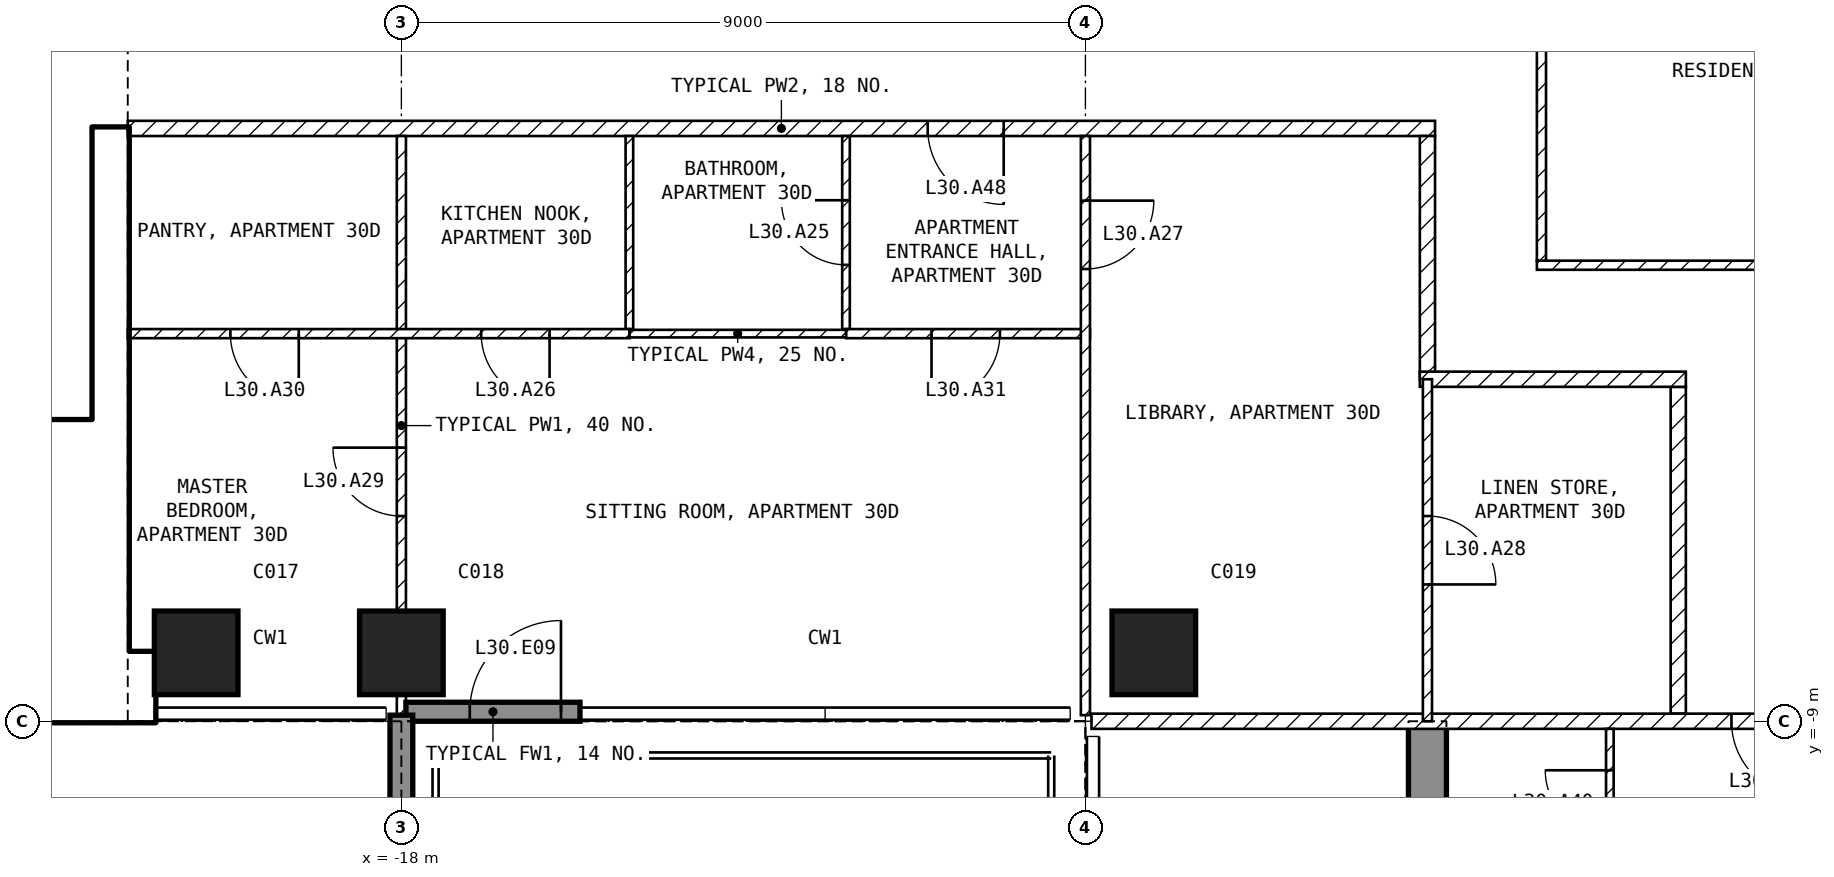
"""IFC4 building model, lengths in metres.
Left out: names, types, materials, properties, quantities, classifications, styles, units other than length and angle.
Written with IfcOpenShell. Run it as: python <this file> out.ifc"""

import sys

from ifc_helpers import new_model, si_unit, direction, frame, frame_2d, origin, origin_2d, place, context, subcontext, project, spatial, polyline, rectangle, outline, extrude, element, fill, save


model = new_model("IFC4")
c1 = context("Model", 3, precision=1e-05, world=origin(), true_north=direction((0.0, 1.0)))
c2 = subcontext(c1, "Body", "Model", "MODEL_VIEW")
j1 = project(units=[si_unit("LENGTHUNIT", "METRE"), si_unit("PLANEANGLEUNIT", "RADIAN")], contexts=[c1])
p1 = place(None, origin())
s1 = spatial("IfcSite", under=j1, at=p1, CompositionType="ELEMENT")
p2 = place(p1, origin())
s2 = spatial("IfcBuilding", under=s1, at=p2, CompositionType="ELEMENT")
p3 = place(p2, frame((0.0, 0.0, 126.9)))
s3 = spatial("IfcBuildingStorey", under=s2, at=p3, CompositionType="ELEMENT", Elevation=126.9)
for number, where, z_axis, x_axis in (
    (1, (-20.7, -8.1, -0.25), (0.0, 0.0, 1.0), (1.0, 0.0, 0.0)),
    (2, (-18.0, -8.1, -0.25), (0.0, 0.0, 1.0), (1.0, 0.0, 0.0)),
    (3, (-8.1, -8.1, -0.25), (0.0, 0.0, 1.0), (1.0, 0.0, 0.0)),
):
    element("IfcColumn", number, at=place(p3, frame(where, z_axis=z_axis, x_axis=x_axis)), inside=s3, PredefinedType="COLUMN", context=c2, shape_type="SweptSolid", body=[
        extrude(rectangle(XDim=1.1, YDim=1.1, at=origin_2d()), origin(), (0.0, 0.0, 1.0), 3.5),
    ])
p4 = place(p3, frame((-4.75, -20.15, -0.25), z_axis=(1.0, 0.0, 0.0), x_axis=(0.0, 1.0, 0.0)))
e4 = element("IfcWall", 4, at=p4, inside=s3, PredefinedType="SHEAR", context=c2, shape_type="SweptSolid", body=[
    extrude(outline(polyline([(0.0, 0.0), (6.65, 0.0), (6.65, 2.65), (9.05, 2.65), (9.05, 0.0), (11.15, 0.0), (11.15, 3.5), (0.0, 3.5), (0.0, 0.0)])), origin(), (0.0, 0.0, 1.0), 0.5),
])
p5 = place(p3, frame((-17.94, -8.875, 0.0), z_axis=(0.0, 0.0, 1.0), x_axis=(1.0, 0.0, 0.0)))
e5 = element("IfcWall", 5, at=p5, inside=s3, PredefinedType="SOLIDWALL", context=c2, shape_type="SweptSolid", body=[
    extrude(rectangle(XDim=2.29, YDim=0.25, at=frame_2d((1.145, 0.0))), origin(), (0.0, 0.0, 1.0), 3.25),
])
p6 = place(p5, frame((0.84, 0.0, 0.0)))
e6 = element("IfcOpeningElement", 6, at=p6, cuts=e5, PredefinedType="OPENING", context=c2, shape_type="SweptSolid", body=[
    extrude(rectangle(XDim=1.2, YDim=2.4, at=frame_2d((0.6, 1.2))), frame((0.0, 0.135, 0.0), z_axis=(0.0, -1.0, 0.0), x_axis=(1.0, 0.0, 0.0)), (0.0, 0.0, 1.0), 0.27),
])
p7 = place(p3, frame((-18.0, -8.92, 0.0), z_axis=(0.0, 0.0, 1.0), x_axis=(0.0, -1.0, 0.0)))
e7 = element("IfcWall", 7, at=p7, inside=s3, PredefinedType="SOLIDWALL", context=c2, shape_type="SweptSolid", body=[
    extrude(rectangle(XDim=2.82, YDim=0.3, at=frame_2d((1.41, 0.0))), origin(), (0.0, 0.0, 1.0), 3.25),
])
p8 = place(p3, frame((-30.2, -8.55, 0.0), z_axis=(0.0, 0.0, 1.0), x_axis=(1.0, 0.0, 0.0)))
e8 = element("IfcWall", 8, at=p8, inside=s3, PredefinedType="SHEAR", context=c2, shape_type="SweptSolid", body=[
    extrude(rectangle(XDim=8.95, YDim=0.9, at=frame_2d((4.475, 0.0))), origin(), (0.0, 0.0, 1.0), 3.25),
])
p9 = place(p3, frame((-21.825, -8.1, 0.0), z_axis=(0.0, 0.0, 1.0), x_axis=(0.0, 1.0, 0.0)))
e9 = element("IfcWall", 9, at=p9, inside=s3, PredefinedType="SHEAR", context=c2, shape_type="SweptSolid", body=[
    extrude(rectangle(XDim=6.9, YDim=0.45, at=frame_2d((3.45, 0.0))), origin(), (0.0, 0.0, 1.0), 3.25),
])
p10 = place(p3, frame((-28.35, -5.15, 0.0), z_axis=(0.0, 0.0, 1.0), x_axis=(1.0, 0.0, 0.0)))
e10 = element("IfcWall", 10, at=p10, inside=s3, PredefinedType="SOLIDWALL", context=c2, shape_type="SweptSolid", body=[
    extrude(rectangle(XDim=6.3, YDim=0.2, at=frame_2d((3.15, 0.0))), origin(), (0.0, 0.0, 1.0), 3.25),
])
p11 = place(p10, frame((5.1, 0.0, 0.0)))
e11 = element("IfcOpeningElement", 11, at=p11, cuts=e10, PredefinedType="OPENING", context=c2, shape_type="SweptSolid", body=[
    extrude(rectangle(XDim=1.0, YDim=2.1, at=frame_2d((0.5, 1.05))), frame((0.0, 0.11, 0.0), z_axis=(0.0, -1.0, 0.0), x_axis=(1.0, 0.0, 0.0)), (0.0, 0.0, 1.0), 0.22),
])
p12 = place(p3, frame((-3.06, -3.0, 0.0), z_axis=(0.0, 0.0, 1.0), x_axis=(1.0, 0.0, 0.0)))
e12 = element("IfcWall", 12, at=p12, inside=s3, PredefinedType="PARTITIONING", context=c2, shape_type="SweptSolid", body=[
    extrude(rectangle(XDim=6.12, YDim=0.12, at=frame_2d((3.06, 0.0))), origin(), (0.0, 0.0, 1.0), 3.25),
])
p13 = place(p3, frame((-3.0, 2.94, 0.0), z_axis=(0.0, 0.0, 1.0), x_axis=(0.0, -1.0, 0.0)))
e13 = element("IfcWall", 13, at=p13, inside=s3, PredefinedType="PARTITIONING", context=c2, shape_type="SweptSolid", body=[
    extrude(rectangle(XDim=5.88, YDim=0.12, at=frame_2d((2.94, 0.0))), origin(), (0.0, 0.0, 1.0), 3.25),
])
p14 = place(p3, frame((-4.4, -1.2, 0.0), z_axis=(0.0, 0.0, 1.0), x_axis=(-1.0, 0.0, 0.0)))
e14 = element("IfcWall", 14, at=p14, inside=s3, PredefinedType="PARTITIONING", context=c2, shape_type="SweptSolid", body=[
    extrude(rectangle(XDim=17.2, YDim=0.2, at=frame_2d((8.6, 0.0))), origin(), (0.0, 0.0, 1.0), 3.25),
])
p15 = place(p14, frame((5.675, 0.0, 0.0)))
e15 = element("IfcOpeningElement", 15, at=p15, cuts=e14, PredefinedType="OPENING", context=c2, shape_type="SweptSolid", body=[
    extrude(rectangle(XDim=1.0, YDim=2.1, at=frame_2d((0.5, 1.05))), frame((0.0, 0.11, 0.0), z_axis=(0.0, -1.0, 0.0), x_axis=(1.0, 0.0, 0.0)), (0.0, 0.0, 1.0), 0.22),
])
p16 = place(p3, frame((-4.5, -4.5, 0.0), z_axis=(0.0, 0.0, 1.0), x_axis=(0.0, 1.0, 0.0)))
e16 = element("IfcWall", 16, at=p16, inside=s3, PredefinedType="PARTITIONING", context=c2, shape_type="SweptSolid", body=[
    extrude(rectangle(XDim=3.2, YDim=0.2, at=frame_2d((1.6, 0.0))), origin(), (0.0, 0.0, 1.0), 3.25),
])
p17 = place(p3, frame((-1.2, -8.9, 0.0), z_axis=(0.0, 0.0, 1.0), x_axis=(0.0, 1.0, 0.0)))
e17 = element("IfcWall", 17, at=p17, inside=s3, PredefinedType="PARTITIONING", context=c2, shape_type="SweptSolid", body=[
    extrude(rectangle(XDim=4.3, YDim=0.2, at=frame_2d((2.15, 0.0))), origin(), (0.0, 0.0, 1.0), 3.25),
])
p18 = place(p3, frame((-1.1, -4.5, 0.0), z_axis=(0.0, 0.0, 1.0), x_axis=(-1.0, 0.0, 0.0)))
e18 = element("IfcWall", 18, at=p18, inside=s3, PredefinedType="PARTITIONING", context=c2, shape_type="SweptSolid", body=[
    extrude(rectangle(XDim=3.5, YDim=0.2, at=frame_2d((1.75, 0.0))), origin(), (0.0, 0.0, 1.0), 3.25),
])
p19 = place(p3, frame((8.92, -9.0, 0.0), z_axis=(0.0, 0.0, 1.0), x_axis=(-1.0, 0.0, 0.0)))
e19 = element("IfcWall", 19, at=p19, inside=s3, PredefinedType="PARTITIONING", context=c2, shape_type="SweptSolid", body=[
    extrude(rectangle(XDim=17.84, YDim=0.2, at=frame_2d((8.92, 0.0))), origin(), (0.0, 0.0, 1.0), 3.25),
])
p20 = place(p19, frame((8.42, 0.0, 0.0)))
e20 = element("IfcOpeningElement", 20, at=p20, cuts=e19, PredefinedType="OPENING", context=c2, shape_type="SweptSolid", body=[
    extrude(rectangle(XDim=1.0, YDim=2.1, at=frame_2d((0.5, 1.05))), frame((0.0, 0.11, 0.0), z_axis=(0.0, -1.0, 0.0), x_axis=(1.0, 0.0, 0.0)), (0.0, 0.0, 1.0), 0.22),
])
p21 = place(p3, frame((-12.15, -3.84, 0.0), z_axis=(0.0, 0.0, 1.0), x_axis=(0.0, 1.0, 0.0)))
e21 = element("IfcWall", 21, at=p21, inside=s3, PredefinedType="PARTITIONING", context=c2, shape_type="SweptSolid", body=[
    extrude(rectangle(XDim=2.54, YDim=0.1, at=frame_2d((1.27, 0.0))), origin(), (0.0, 0.0, 1.0), 3.25),
])
p22 = place(p21, frame((0.845, 0.0, 0.0)))
e22 = element("IfcOpeningElement", 22, at=p22, cuts=e21, PredefinedType="OPENING", context=c2, shape_type="SweptSolid", body=[
    extrude(rectangle(XDim=0.85, YDim=2.1, at=frame_2d((0.425, 1.05))), frame((0.0, 0.06, 0.0), z_axis=(0.0, -1.0, 0.0), x_axis=(1.0, 0.0, 0.0)), (0.0, 0.0, 1.0), 0.12),
])
p23 = place(p3, frame((-8.94, -3.9, 0.0), z_axis=(0.0, 0.0, 1.0), x_axis=(-1.0, 0.0, 0.0)))
e23 = element("IfcWall", 23, at=p23, inside=s3, PredefinedType="PARTITIONING", context=c2, shape_type="SweptSolid", body=[
    extrude(rectangle(XDim=3.21, YDim=0.12, at=frame_2d((1.605, 0.0))), origin(), (0.0, 0.0, 1.0), 3.25),
])
p24 = place(p23, frame((1.185, 0.0, 0.0)))
e24 = element("IfcOpeningElement", 24, at=p24, cuts=e23, PredefinedType="OPENING", context=c2, shape_type="SweptSolid", body=[
    extrude(rectangle(XDim=0.9, YDim=2.1, at=frame_2d((0.45, 1.05))), frame((0.0, 0.07, 0.0), z_axis=(0.0, -1.0, 0.0), x_axis=(1.0, 0.0, 0.0)), (0.0, 0.0, 1.0), 0.14),
])
p25 = place(p3, frame((-9.0, -1.3, 0.0), z_axis=(0.0, 0.0, 1.0), x_axis=(0.0, -1.0, 0.0)))
e25 = element("IfcWall", 25, at=p25, inside=s3, PredefinedType="PARTITIONING", context=c2, shape_type="SweptSolid", body=[
    extrude(rectangle(XDim=7.62, YDim=0.12, at=frame_2d((3.81, 0.0))), origin(), (0.0, 0.0, 1.0), 3.25),
])
p26 = place(p25, frame((0.85, 0.0, 0.0)))
e26 = element("IfcOpeningElement", 26, at=p26, cuts=e25, PredefinedType="OPENING", context=c2, shape_type="SweptSolid", body=[
    extrude(rectangle(XDim=0.9, YDim=2.1, at=frame_2d((0.45, 1.05))), frame((0.0, 0.07, 0.0), z_axis=(0.0, -1.0, 0.0), x_axis=(1.0, 0.0, 0.0)), (0.0, 0.0, 1.0), 0.14),
])
p27 = place(p3, frame((-15.0, -3.84, 0.0), z_axis=(0.0, 0.0, 1.0), x_axis=(0.0, 1.0, 0.0)))
e27 = element("IfcWall", 27, at=p27, inside=s3, PredefinedType="PARTITIONING", context=c2, shape_type="SweptSolid", body=[
    extrude(rectangle(XDim=2.54, YDim=0.1, at=frame_2d((1.27, 0.0))), origin(), (0.0, 0.0, 1.0), 3.25),
])
p28 = place(p3, frame((-12.15, -3.9, 0.0), z_axis=(0.0, 0.0, 1.0), x_axis=(-1.0, 0.0, 0.0)))
e28 = element("IfcWall", 28, at=p28, inside=s3, PredefinedType="PARTITIONING", context=c2, shape_type="SweptSolid", body=[
    extrude(rectangle(XDim=2.85, YDim=0.1, at=frame_2d((1.425, 0.0))), origin(), (0.0, 0.0, 1.0), 3.25),
])
p29 = place(p3, frame((-18.0, -8.92, 0.0), z_axis=(0.0, 0.0, 1.0), x_axis=(0.0, 1.0, 0.0)))
e29 = element("IfcWall", 29, at=p29, inside=s3, PredefinedType="PARTITIONING", context=c2, shape_type="SweptSolid", body=[
    extrude(rectangle(XDim=7.62, YDim=0.12, at=frame_2d((3.81, 0.0))), origin(), (0.0, 0.0, 1.0), 2.414),
])
p30 = place(p29, frame((2.62, 0.0, 0.0)))
e30 = element("IfcOpeningElement", 30, at=p30, cuts=e29, PredefinedType="OPENING", context=c2, shape_type="SweptSolid", body=[
    extrude(rectangle(XDim=0.9, YDim=2.1, at=frame_2d((0.45, 1.05))), frame((0.0, 0.07, 0.0), z_axis=(0.0, -1.0, 0.0), x_axis=(1.0, 0.0, 0.0)), (0.0, 0.0, 1.0), 0.14),
])
p31 = place(p3, frame((-15.0, -3.9, 0.0), z_axis=(0.0, 0.0, 1.0), x_axis=(-1.0, 0.0, 0.0)))
e31 = element("IfcWall", 31, at=p31, inside=s3, PredefinedType="PARTITIONING", context=c2, shape_type="SweptSolid", body=[
    extrude(rectangle(XDim=6.6, YDim=0.12, at=frame_2d((3.3, 0.0))), origin(), (0.0, 0.0, 1.0), 3.25),
])
p32 = place(p31, frame((1.05, 0.0, 0.0)))
e32 = element("IfcOpeningElement", 32, at=p32, cuts=e31, PredefinedType="OPENING", context=c2, shape_type="SweptSolid", body=[
    extrude(rectangle(XDim=0.9, YDim=2.1, at=frame_2d((0.45, 1.05))), frame((0.0, 0.07, 0.0), z_axis=(0.0, -1.0, 0.0), x_axis=(1.0, 0.0, 0.0)), (0.0, 0.0, 1.0), 0.14),
])
p33 = place(p31, frame((4.35, 0.0, 0.0)))
e33 = element("IfcOpeningElement", 33, at=p33, cuts=e31, PredefinedType="OPENING", context=c2, shape_type="SweptSolid", body=[
    extrude(rectangle(XDim=0.9, YDim=2.1, at=frame_2d((0.45, 1.05))), frame((0.0, 0.07, 0.0), z_axis=(0.0, -1.0, 0.0), x_axis=(1.0, 0.0, 0.0)), (0.0, 0.0, 1.0), 0.14),
])
p34 = place(p3, frame((-4.5, -4.5, 0.0), z_axis=(0.0, 0.0, 1.0), x_axis=(0.0, -1.0, 0.0)))
e34 = element("IfcWall", 34, at=p34, inside=s3, PredefinedType="PARTITIONING", context=c2, shape_type="SweptSolid", body=[
    extrude(rectangle(XDim=4.5, YDim=0.12, at=frame_2d((2.25, 0.0))), origin(), (0.0, 0.0, 1.0), 3.25),
])
p35 = place(p34, frame((1.8, 0.0, 0.0)))
e35 = element("IfcOpeningElement", 35, at=p35, cuts=e34, PredefinedType="OPENING", context=c2, shape_type="SweptSolid", body=[
    extrude(rectangle(XDim=0.9, YDim=2.1, at=frame_2d((0.45, 1.05))), frame((0.0, 0.07, 0.0), z_axis=(0.0, -1.0, 0.0), x_axis=(1.0, 0.0, 0.0)), (0.0, 0.0, 1.0), 0.14),
])
p36 = place(p3, frame((-2.1, -11.04, 0.0), z_axis=(0.0, 0.0, 1.0), x_axis=(0.0, 1.0, 0.0)))
e36 = element("IfcWall", 36, at=p36, inside=s3, PredefinedType="PARTITIONING", context=c2, shape_type="SweptSolid", body=[
    extrude(rectangle(XDim=1.94, YDim=0.1, at=frame_2d((0.97, 0.0))), origin(), (0.0, 0.0, 1.0), 3.25),
])
p37 = place(p36, frame((0.545, 0.0, 0.0)))
e37 = element("IfcOpeningElement", 37, at=p37, cuts=e36, PredefinedType="OPENING", context=c2, shape_type="SweptSolid", body=[
    extrude(rectangle(XDim=0.85, YDim=2.1, at=frame_2d((0.425, 1.05))), frame((0.0, 0.06, 0.0), z_axis=(0.0, -1.0, 0.0), x_axis=(1.0, 0.0, 0.0)), (0.0, 0.0, 1.0), 0.12),
])
p38 = place(p6, origin())
e38 = element("IfcDoor", 38, at=p38, inside=s3, OperationType="SINGLE_SWING_RIGHT", PredefinedType="DOOR", context=c2, shape_type="SweptSolid", body=[
    extrude(rectangle(XDim=1.2, YDim=2.4, at=frame_2d((0.6, 1.2))), frame((0.0, 0.025, 0.0), z_axis=(0.0, -1.0, 0.0), x_axis=(1.0, 0.0, 0.0)), (0.0, 0.0, 1.0), 0.05),
])
fill(e6, e38)
p39 = place(p11, origin())
e39 = element("IfcDoor", 39, at=p39, inside=s3, OperationType="SINGLE_SWING_LEFT", PredefinedType="DOOR", context=c2, shape_type="SweptSolid", body=[
    extrude(rectangle(XDim=1.0, YDim=2.1, at=frame_2d((0.5, 1.05))), frame((0.0, 0.025, 0.0), z_axis=(0.0, -1.0, 0.0), x_axis=(1.0, 0.0, 0.0)), (0.0, 0.0, 1.0), 0.05),
])
fill(e11, e39)
p40 = place(p22, origin())
e40 = element("IfcDoor", 40, at=p40, inside=s3, OperationType="SINGLE_SWING_RIGHT", PredefinedType="DOOR", context=c2, shape_type="SweptSolid", body=[
    extrude(rectangle(XDim=0.85, YDim=2.1, at=frame_2d((0.425, 1.05))), frame((0.0, 0.025, 0.0), z_axis=(0.0, -1.0, 0.0), x_axis=(1.0, 0.0, 0.0)), (0.0, 0.0, 1.0), 0.05),
])
fill(e22, e40)
p41 = place(p32, origin())
e41 = element("IfcDoor", 41, at=p41, inside=s3, OperationType="SINGLE_SWING_LEFT", PredefinedType="DOOR", context=c2, shape_type="SweptSolid", body=[
    extrude(rectangle(XDim=0.9, YDim=2.1, at=frame_2d((0.45, 1.05))), frame((0.0, 0.025, 0.0), z_axis=(0.0, -1.0, 0.0), x_axis=(1.0, 0.0, 0.0)), (0.0, 0.0, 1.0), 0.05),
])
fill(e32, e41)
p42 = place(p26, origin())
e42 = element("IfcDoor", 42, at=p42, inside=s3, OperationType="SINGLE_SWING_LEFT", PredefinedType="DOOR", context=c2, shape_type="SweptSolid", body=[
    extrude(rectangle(XDim=0.9, YDim=2.1, at=frame_2d((0.45, 1.05))), frame((0.0, 0.025, 0.0), z_axis=(0.0, -1.0, 0.0), x_axis=(1.0, 0.0, 0.0)), (0.0, 0.0, 1.0), 0.05),
])
fill(e26, e42)
p43 = place(p35, origin())
e43 = element("IfcDoor", 43, at=p43, inside=s3, OperationType="SINGLE_SWING_RIGHT", PredefinedType="DOOR", context=c2, shape_type="SweptSolid", body=[
    extrude(rectangle(XDim=0.9, YDim=2.1, at=frame_2d((0.45, 1.05))), frame((0.0, 0.025, 0.0), z_axis=(0.0, -1.0, 0.0), x_axis=(1.0, 0.0, 0.0)), (0.0, 0.0, 1.0), 0.05),
])
fill(e35, e43)
p44 = place(p30, origin())
e44 = element("IfcDoor", 44, at=p44, inside=s3, OperationType="SINGLE_SWING_RIGHT", PredefinedType="DOOR", context=c2, shape_type="SweptSolid", body=[
    extrude(rectangle(XDim=0.9, YDim=2.1, at=frame_2d((0.45, 1.05))), frame((0.0, 0.025, 0.0), z_axis=(0.0, -1.0, 0.0), x_axis=(1.0, 0.0, 0.0)), (0.0, 0.0, 1.0), 0.05),
])
fill(e30, e44)
p45 = place(p33, origin())
e45 = element("IfcDoor", 45, at=p45, inside=s3, OperationType="SINGLE_SWING_LEFT", PredefinedType="DOOR", context=c2, shape_type="SweptSolid", body=[
    extrude(rectangle(XDim=0.9, YDim=2.1, at=frame_2d((0.45, 1.05))), frame((0.0, 0.025, 0.0), z_axis=(0.0, -1.0, 0.0), x_axis=(1.0, 0.0, 0.0)), (0.0, 0.0, 1.0), 0.05),
])
fill(e33, e45)
p46 = place(p24, origin())
e46 = element("IfcDoor", 46, at=p46, inside=s3, OperationType="SINGLE_SWING_RIGHT", PredefinedType="DOOR", context=c2, shape_type="SweptSolid", body=[
    extrude(rectangle(XDim=0.9, YDim=2.1, at=frame_2d((0.45, 1.05))), frame((0.0, 0.025, 0.0), z_axis=(0.0, -1.0, 0.0), x_axis=(1.0, 0.0, 0.0)), (0.0, 0.0, 1.0), 0.05),
])
fill(e24, e46)
p47 = place(p20, origin())
e47 = element("IfcDoor", 47, at=p47, inside=s3, OperationType="SINGLE_SWING_LEFT", PredefinedType="DOOR", context=c2, shape_type="SweptSolid", body=[
    extrude(rectangle(XDim=1.0, YDim=2.1, at=frame_2d((0.5, 1.05))), frame((0.0, 0.025, 0.0), z_axis=(0.0, -1.0, 0.0), x_axis=(1.0, 0.0, 0.0)), (0.0, 0.0, 1.0), 0.05),
])
fill(e20, e47)
p48 = place(p37, origin())
e48 = element("IfcDoor", 48, at=p48, inside=s3, OperationType="SINGLE_SWING_RIGHT", PredefinedType="DOOR", context=c2, shape_type="SweptSolid", body=[
    extrude(rectangle(XDim=0.85, YDim=2.1, at=frame_2d((0.425, 1.05))), frame((0.0, 0.025, 0.0), z_axis=(0.0, -1.0, 0.0), x_axis=(1.0, 0.0, 0.0)), (0.0, 0.0, 1.0), 0.05),
])
fill(e37, e48)
p49 = place(p15, origin())
e49 = element("IfcDoor", 49, at=p49, inside=s3, OperationType="SINGLE_SWING_LEFT", PredefinedType="DOOR", context=c2, shape_type="SweptSolid", body=[
    extrude(rectangle(XDim=1.0, YDim=2.1, at=frame_2d((0.5, 1.05))), frame((0.0, 0.025, 0.0), z_axis=(0.0, -1.0, 0.0), x_axis=(1.0, 0.0, 0.0)), (0.0, 0.0, 1.0), 0.05),
])
fill(e15, e49)
save(model, sys.argv[1])
